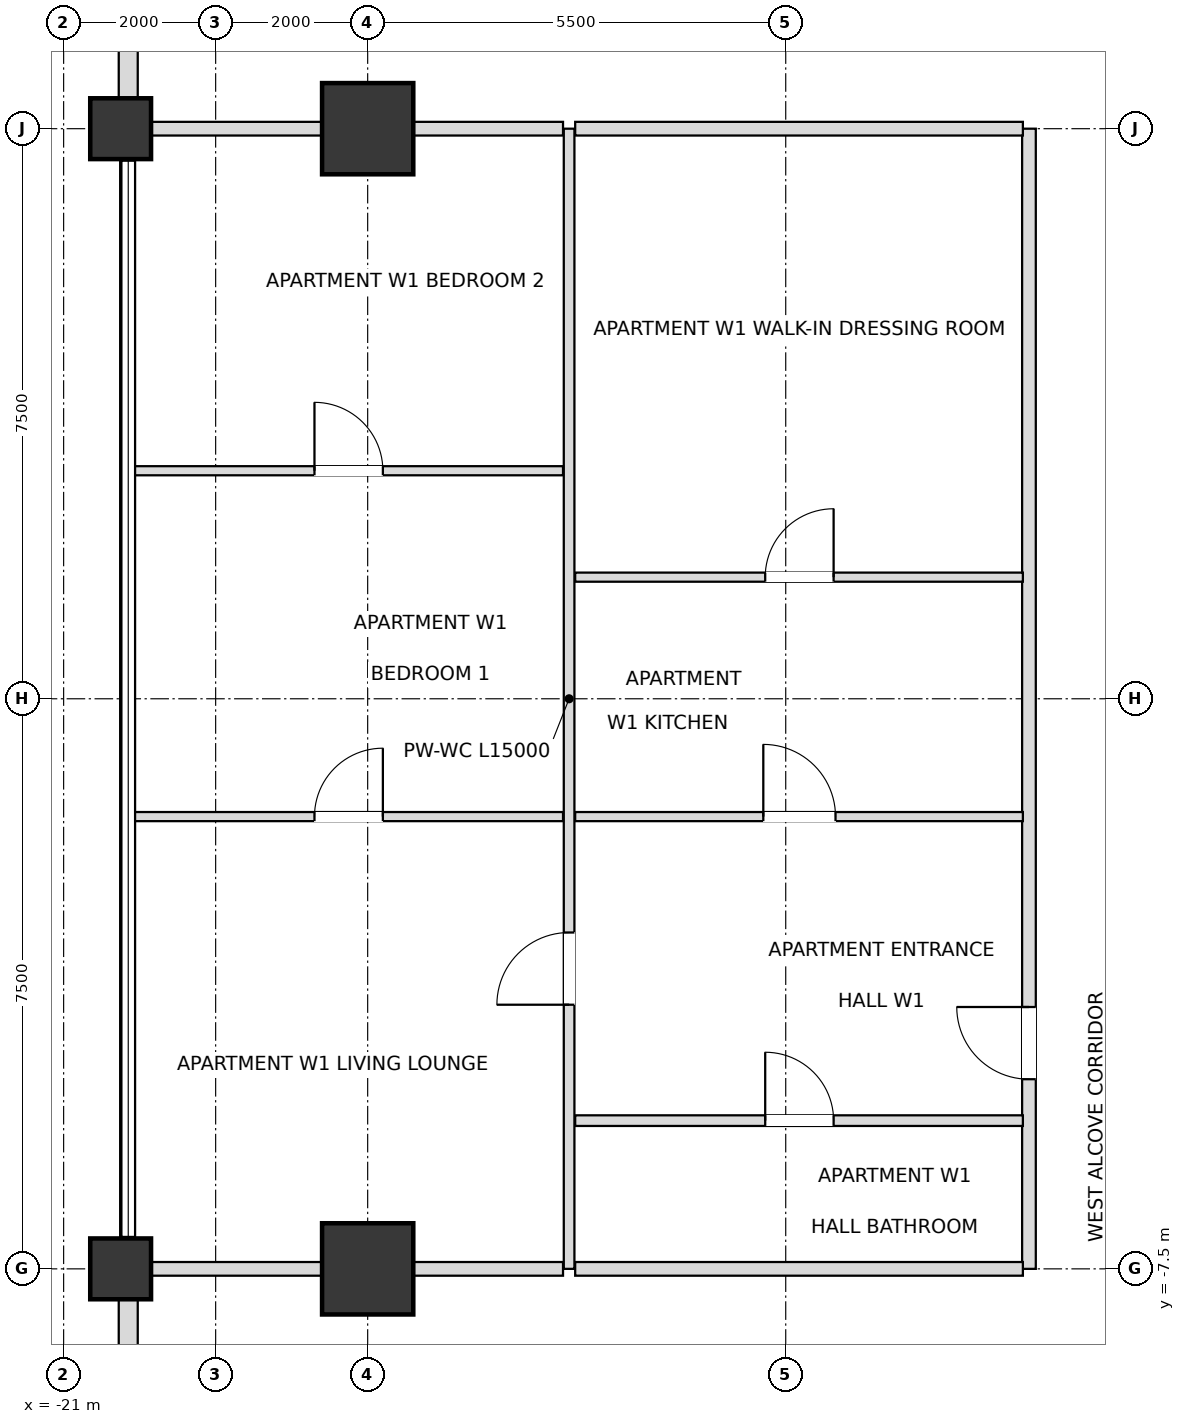
"""IFC4 building model, lengths in metres.
Left out: names, types, materials, properties, quantities, classifications, styles, units other than length and angle.
Written with IfcOpenShell. Run it as: python <this file> out.ifc"""

import sys

from ifc_helpers import new_model, si_unit, direction, frame, frame_2d, origin, origin_2d, place, context, subcontext, project, spatial, rectangle, extrude, element, fill, save


model = new_model("IFC4")
c1 = context("Model", 3, precision=1e-05, world=origin(), true_north=direction((0.0, 1.0)))
c2 = subcontext(c1, "Body", "Model", "MODEL_VIEW")
j1 = project(units=[si_unit("LENGTHUNIT", "METRE"), si_unit("PLANEANGLEUNIT", "RADIAN")], contexts=[c1])
p1 = place(None, origin())
s1 = spatial("IfcSite", under=j1, at=p1, CompositionType="ELEMENT")
p2 = place(p1, origin())
s2 = spatial("IfcBuilding", under=s1, at=p2, CompositionType="ELEMENT")
p3 = place(p2, frame((0.0, 0.0, 140.4)))
s3 = spatial("IfcBuildingStorey", under=s2, at=p3, CompositionType="ELEMENT", Elevation=140.4)
for number, where, z_axis, x_axis in (
    (1, (-17.0, 7.5, 0.0), (0.0, 0.0, 1.0), (1.0, 0.0, 0.0)),
    (2, (-17.0, -7.5, 0.0), (0.0, 0.0, 1.0), (1.0, 0.0, 0.0)),
):
    element("IfcColumn", number, at=place(p3, frame(where, z_axis=z_axis, x_axis=x_axis)), inside=s3, PredefinedType="USERDEFINED", context=c2, shape_type="SweptSolid", body=[
        extrude(rectangle(XDim=1.2, YDim=1.2, at=origin_2d()), origin(), (0.0, 0.0, 1.0), 3.6),
    ])
for number, where, z_axis, x_axis in (
    (3, (-20.25, -7.5, 0.0), (0.0, 0.0, 1.0), (1.0, 0.0, 0.0)),
    (4, (-20.25, 7.5, 0.0), (0.0, 0.0, 1.0), (1.0, 0.0, 0.0)),
):
    element("IfcColumn", number, at=place(p3, frame(where, z_axis=z_axis, x_axis=x_axis)), inside=s3, PredefinedType="COLUMN", context=c2, shape_type="SweptSolid", body=[
        extrude(rectangle(XDim=0.8, YDim=0.8, at=origin_2d()), origin(), (0.0, 0.0, 1.0), 3.6),
    ])
p4 = place(p3, frame((-20.15, 12.605, 0.0), z_axis=(0.0, 0.0, 1.0), x_axis=(0.0, -1.0, 0.0)))
e5 = element("IfcWall", 5, at=p4, inside=s3, PredefinedType="SOLIDWALL", context=c2, shape_type="SweptSolid", body=[
    extrude(rectangle(XDim=4.71, YDim=0.25, at=frame_2d((2.355, 0.0))), origin(), (0.0, 0.0, 1.0), 2.736),
])
p5 = place(p4, frame((1.455, 0.0, 0.72)))
e6 = element("IfcOpeningElement", 6, at=p5, cuts=e5, PredefinedType="OPENING", context=c2, shape_type="SweptSolid", body=[
    extrude(rectangle(XDim=1.8, YDim=1.68, at=frame_2d((0.9, 0.84))), frame((0.0, 0.135, 0.0), z_axis=(0.0, -1.0, 0.0), x_axis=(1.0, 0.0, 0.0)), (0.0, 0.0, 1.0), 0.27),
])
p6 = place(p3, frame((-20.15, -7.895, 0.0), z_axis=(0.0, 0.0, 1.0), x_axis=(0.0, -1.0, 0.0)))
e7 = element("IfcWall", 7, at=p6, inside=s3, PredefinedType="SOLIDWALL", context=c2, shape_type="SweptSolid", body=[
    extrude(rectangle(XDim=4.71, YDim=0.25, at=frame_2d((2.355, 0.0))), origin(), (0.0, 0.0, 1.0), 2.736),
])
p7 = place(p6, frame((1.455, 0.0, 0.72)))
e8 = element("IfcOpeningElement", 8, at=p7, cuts=e7, PredefinedType="OPENING", context=c2, shape_type="SweptSolid", body=[
    extrude(rectangle(XDim=1.8, YDim=1.68, at=frame_2d((0.9, 0.84))), frame((0.0, 0.135, 0.0), z_axis=(0.0, -1.0, 0.0), x_axis=(1.0, 0.0, 0.0)), (0.0, 0.0, 1.0), 0.27),
])
p8 = place(p3, frame((-14.35, -7.5, 0.0), z_axis=(0.0, 0.0, 1.0), x_axis=(0.0, 1.0, 0.0)))
e9 = element("IfcWall", 9, at=p8, inside=s3, PredefinedType="PARTITIONING", context=c2, shape_type="SweptSolid", body=[
    extrude(rectangle(XDim=15.0, YDim=0.14, at=frame_2d((7.5, 0.0))), origin(), (0.0, 0.0, 1.0), 3.38),
])
p9 = place(p8, frame((3.475, 0.0, 0.0)))
e10 = element("IfcOpeningElement", 10, at=p9, cuts=e9, PredefinedType="OPENING", context=c2, shape_type="SweptSolid", body=[
    extrude(rectangle(XDim=0.95, YDim=2.1, at=frame_2d((0.475, 1.05))), frame((0.0, 0.08, 0.0), z_axis=(0.0, -1.0, 0.0), x_axis=(1.0, 0.0, 0.0)), (0.0, 0.0, 1.0), 0.16),
])
p10 = place(p3, frame((-8.3, -7.5, 0.0), z_axis=(0.0, 0.0, 1.0), x_axis=(0.0, 1.0, 0.0)))
e11 = element("IfcWall", 11, at=p10, inside=s3, PredefinedType="PARTITIONING", context=c2, shape_type="SweptSolid", body=[
    extrude(rectangle(XDim=15.0, YDim=0.18, at=frame_2d((7.5, 0.0))), origin(), (0.0, 0.0, 1.0), 3.38),
])
p11 = place(p10, frame((2.495, 0.0, 0.0)))
e12 = element("IfcOpeningElement", 12, at=p11, cuts=e11, PredefinedType="OPENING", context=c2, shape_type="SweptSolid", body=[
    extrude(rectangle(XDim=0.95, YDim=2.15, at=frame_2d((0.475, 1.075))), frame((0.0, 0.1, 0.0), z_axis=(0.0, -1.0, 0.0), x_axis=(1.0, 0.0, 0.0)), (0.0, 0.0, 1.0), 0.2),
])
p12 = place(p3, frame((-20.15, -7.5, 0.0), z_axis=(0.0, 0.0, 1.0), x_axis=(1.0, 0.0, 0.0)))
e13 = element("IfcWall", 13, at=p12, inside=s3, PredefinedType="PARTITIONING", context=c2, shape_type="SweptSolid", body=[
    extrude(rectangle(XDim=5.72, YDim=0.18, at=frame_2d((2.86, 0.0))), origin(), (0.0, 0.0, 1.0), 2.816),
])
p13 = place(p3, frame((-14.27, -7.5, 0.0), z_axis=(0.0, 0.0, 1.0), x_axis=(1.0, 0.0, 0.0)))
e14 = element("IfcWall", 14, at=p13, inside=s3, PredefinedType="PARTITIONING", context=c2, shape_type="SweptSolid", body=[
    extrude(rectangle(XDim=5.89, YDim=0.18, at=frame_2d((2.945, 0.0))), origin(), (0.0, 0.0, 1.0), 2.816),
])
p14 = place(p3, frame((-14.27, -5.55, 0.0), z_axis=(0.0, 0.0, 1.0), x_axis=(1.0, 0.0, 0.0)))
e15 = element("IfcWall", 15, at=p14, inside=s3, PredefinedType="PARTITIONING", context=c2, shape_type="SweptSolid", body=[
    extrude(rectangle(XDim=5.89, YDim=0.14, at=frame_2d((2.945, 0.0))), origin(), (0.0, 0.0, 1.0), 3.38),
])
p15 = place(p14, frame((2.5, 0.0, 0.0)))
e16 = element("IfcOpeningElement", 16, at=p15, cuts=e15, PredefinedType="OPENING", context=c2, shape_type="SweptSolid", body=[
    extrude(rectangle(XDim=0.9, YDim=2.1, at=frame_2d((0.45, 1.05))), frame((0.0, 0.08, 0.0), z_axis=(0.0, -1.0, 0.0), x_axis=(1.0, 0.0, 0.0)), (0.0, 0.0, 1.0), 0.16),
])
p16 = place(p3, frame((-20.07, -1.55, 0.0), z_axis=(0.0, 0.0, 1.0), x_axis=(1.0, 0.0, 0.0)))
e17 = element("IfcWall", 17, at=p16, inside=s3, PredefinedType="PARTITIONING", context=c2, shape_type="SweptSolid", body=[
    extrude(rectangle(XDim=5.64, YDim=0.12, at=frame_2d((2.82, 0.0))), origin(), (0.0, 0.0, 1.0), 2.816),
])
p17 = place(p16, frame((2.37, 0.0, 0.0)))
e18 = element("IfcOpeningElement", 18, at=p17, cuts=e17, PredefinedType="OPENING", context=c2, shape_type="SweptSolid", body=[
    extrude(rectangle(XDim=0.9, YDim=2.1, at=frame_2d((0.45, 1.05))), frame((0.0, 0.07, 0.0), z_axis=(0.0, -1.0, 0.0), x_axis=(1.0, 0.0, 0.0)), (0.0, 0.0, 1.0), 0.14),
])
p18 = place(p3, frame((-14.27, -1.55, 0.0), z_axis=(0.0, 0.0, 1.0), x_axis=(1.0, 0.0, 0.0)))
e19 = element("IfcWall", 19, at=p18, inside=s3, PredefinedType="PARTITIONING", context=c2, shape_type="SweptSolid", body=[
    extrude(rectangle(XDim=5.89, YDim=0.12, at=frame_2d((2.945, 0.0))), origin(), (0.0, 0.0, 1.0), 3.38),
])
p19 = place(p18, frame((2.475, 0.0, 0.0)))
e20 = element("IfcOpeningElement", 20, at=p19, cuts=e19, PredefinedType="OPENING", context=c2, shape_type="SweptSolid", body=[
    extrude(rectangle(XDim=0.95, YDim=2.1, at=frame_2d((0.475, 1.05))), frame((0.0, 0.07, 0.0), z_axis=(0.0, -1.0, 0.0), x_axis=(1.0, 0.0, 0.0)), (0.0, 0.0, 1.0), 0.14),
])
p20 = place(p3, frame((-14.27, 1.6, 0.0), z_axis=(0.0, 0.0, 1.0), x_axis=(1.0, 0.0, 0.0)))
e21 = element("IfcWall", 21, at=p20, inside=s3, PredefinedType="PARTITIONING", context=c2, shape_type="SweptSolid", body=[
    extrude(rectangle(XDim=5.89, YDim=0.12, at=frame_2d((2.945, 0.0))), origin(), (0.0, 0.0, 1.0), 3.38),
])
p21 = place(p20, frame((2.5, 0.0, 0.0)))
e22 = element("IfcOpeningElement", 22, at=p21, cuts=e21, PredefinedType="OPENING", context=c2, shape_type="SweptSolid", body=[
    extrude(rectangle(XDim=0.9, YDim=2.1, at=frame_2d((0.45, 1.05))), frame((0.0, 0.07, 0.0), z_axis=(0.0, -1.0, 0.0), x_axis=(1.0, 0.0, 0.0)), (0.0, 0.0, 1.0), 0.14),
])
p22 = place(p3, frame((-20.07, 3.0, 0.0), z_axis=(0.0, 0.0, 1.0), x_axis=(1.0, 0.0, 0.0)))
e23 = element("IfcWall", 23, at=p22, inside=s3, PredefinedType="PARTITIONING", context=c2, shape_type="SweptSolid", body=[
    extrude(rectangle(XDim=5.64, YDim=0.12, at=frame_2d((2.82, 0.0))), origin(), (0.0, 0.0, 1.0), 2.816),
])
p23 = place(p22, frame((2.37, 0.0, 0.0)))
e24 = element("IfcOpeningElement", 24, at=p23, cuts=e23, PredefinedType="OPENING", context=c2, shape_type="SweptSolid", body=[
    extrude(rectangle(XDim=0.9, YDim=2.1, at=frame_2d((0.45, 1.05))), frame((0.0, 0.07, 0.0), z_axis=(0.0, -1.0, 0.0), x_axis=(1.0, 0.0, 0.0)), (0.0, 0.0, 1.0), 0.14),
])
p24 = place(p3, frame((-20.15, 7.5, 0.0), z_axis=(0.0, 0.0, 1.0), x_axis=(1.0, 0.0, 0.0)))
e25 = element("IfcWall", 25, at=p24, inside=s3, PredefinedType="PARTITIONING", context=c2, shape_type="SweptSolid", body=[
    extrude(rectangle(XDim=5.72, YDim=0.18, at=frame_2d((2.86, 0.0))), origin(), (0.0, 0.0, 1.0), 2.816),
])
p25 = place(p3, frame((-14.27, 7.5, 0.0), z_axis=(0.0, 0.0, 1.0), x_axis=(1.0, 0.0, 0.0)))
e26 = element("IfcWall", 26, at=p25, inside=s3, PredefinedType="PARTITIONING", context=c2, shape_type="SweptSolid", body=[
    extrude(rectangle(XDim=5.89, YDim=0.18, at=frame_2d((2.945, 0.0))), origin(), (0.0, 0.0, 1.0), 2.816),
])
p26 = place(p15, origin())
e27 = element("IfcDoor", 27, at=p26, inside=s3, OperationType="SINGLE_SWING_LEFT", PredefinedType="DOOR", context=c2, shape_type="SweptSolid", body=[
    extrude(rectangle(XDim=0.9, YDim=2.1, at=frame_2d((0.45, 1.05))), frame((0.0, 0.025, 0.0), z_axis=(0.0, -1.0, 0.0), x_axis=(1.0, 0.0, 0.0)), (0.0, 0.0, 1.0), 0.05),
])
fill(e16, e27)
p27 = place(p11, origin())
e28 = element("IfcDoor", 28, at=p27, inside=s3, OperationType="SINGLE_SWING_RIGHT", PredefinedType="DOOR", context=c2, shape_type="SweptSolid", body=[
    extrude(rectangle(XDim=0.95, YDim=2.15, at=frame_2d((0.475, 1.075))), frame((0.0, 0.025, 0.0), z_axis=(0.0, -1.0, 0.0), x_axis=(1.0, 0.0, 0.0)), (0.0, 0.0, 1.0), 0.05),
])
fill(e12, e28)
p28 = place(p19, origin())
e29 = element("IfcDoor", 29, at=p28, inside=s3, OperationType="SINGLE_SWING_LEFT", PredefinedType="DOOR", context=c2, shape_type="SweptSolid", body=[
    extrude(rectangle(XDim=0.95, YDim=2.1, at=frame_2d((0.475, 1.05))), frame((0.0, 0.025, 0.0), z_axis=(0.0, -1.0, 0.0), x_axis=(1.0, 0.0, 0.0)), (0.0, 0.0, 1.0), 0.05),
])
fill(e20, e29)
p29 = place(p21, origin())
e30 = element("IfcDoor", 30, at=p29, inside=s3, OperationType="SINGLE_SWING_RIGHT", PredefinedType="DOOR", context=c2, shape_type="SweptSolid", body=[
    extrude(rectangle(XDim=0.9, YDim=2.1, at=frame_2d((0.45, 1.05))), frame((0.0, 0.025, 0.0), z_axis=(0.0, -1.0, 0.0), x_axis=(1.0, 0.0, 0.0)), (0.0, 0.0, 1.0), 0.05),
])
fill(e22, e30)
p30 = place(p9, origin())
e31 = element("IfcDoor", 31, at=p30, inside=s3, OperationType="SINGLE_SWING_LEFT", PredefinedType="DOOR", context=c2, shape_type="SweptSolid", body=[
    extrude(rectangle(XDim=0.95, YDim=2.1, at=frame_2d((0.475, 1.05))), frame((0.0, 0.025, 0.0), z_axis=(0.0, -1.0, 0.0), x_axis=(1.0, 0.0, 0.0)), (0.0, 0.0, 1.0), 0.05),
])
fill(e10, e31)
p31 = place(p17, origin())
e32 = element("IfcDoor", 32, at=p31, inside=s3, OperationType="SINGLE_SWING_RIGHT", PredefinedType="DOOR", context=c2, shape_type="SweptSolid", body=[
    extrude(rectangle(XDim=0.9, YDim=2.1, at=frame_2d((0.45, 1.05))), frame((0.0, 0.025, 0.0), z_axis=(0.0, -1.0, 0.0), x_axis=(1.0, 0.0, 0.0)), (0.0, 0.0, 1.0), 0.05),
])
fill(e18, e32)
p32 = place(p23, origin())
e33 = element("IfcDoor", 33, at=p32, inside=s3, OperationType="SINGLE_SWING_LEFT", PredefinedType="DOOR", context=c2, shape_type="SweptSolid", body=[
    extrude(rectangle(XDim=0.9, YDim=2.1, at=frame_2d((0.45, 1.05))), frame((0.0, 0.025, 0.0), z_axis=(0.0, -1.0, 0.0), x_axis=(1.0, 0.0, 0.0)), (0.0, 0.0, 1.0), 0.05),
])
fill(e24, e33)
save(model, sys.argv[1])
